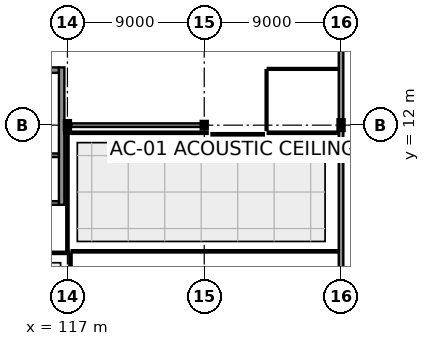
"""IFC4 building model, lengths in metres.
Left out: names, types, materials, properties, quantities, classifications, styles, units other than length and angle.
Written with IfcOpenShell. Run it as: python <this file> out.ifc"""

import sys

from ifc_helpers import new_model, si_unit, direction, frame, frame_2d, origin, origin_2d, place, context, subcontext, project, spatial, rectangle, i_section, extrude, element, fill, save


model = new_model("IFC4")
c1 = context("Model", 3, precision=1e-05, world=origin(), true_north=direction((0.0, 1.0)))
c2 = subcontext(c1, "Body", "Model", "MODEL_VIEW")
j1 = project(units=[si_unit("LENGTHUNIT", "METRE"), si_unit("PLANEANGLEUNIT", "RADIAN")], contexts=[c1])
p1 = place(None, origin())
s1 = spatial("IfcSite", under=j1, at=p1, CompositionType="ELEMENT")
p2 = place(p1, origin())
s2 = spatial("IfcBuilding", under=s1, at=p2, CompositionType="ELEMENT")
p3 = place(p2, frame((0.0, 0.0, 5.4)))
s3 = spatial("IfcBuildingStorey", under=s2, at=p3, CompositionType="ELEMENT", Elevation=5.4)
p4 = place(p3, frame((117.0, 12.0, 0.0), z_axis=(0.0, 0.0, 1.0), x_axis=(0.0, 1.0, 0.0)))
e1 = element("IfcColumn", 1, at=p4, inside=s3, PredefinedType="COLUMN", context=c2, shape_type="SweptSolid", body=[
    extrude(i_section(OverallWidth=0.3, OverallDepth=0.5, WebThickness=0.014, FlangeThickness=0.028, at=origin_2d()), origin(), (0.0, 0.0, 1.0), 4.5),
])
p5 = place(p3, frame((126.0, 12.0, 0.0), z_axis=(0.0, 0.0, 1.0), x_axis=(1.0, 0.0, 0.0)))
e2 = element("IfcColumn", 2, at=p5, inside=s3, PredefinedType="COLUMN", context=c2, shape_type="SweptSolid", body=[
    extrude(i_section(OverallWidth=0.3, OverallDepth=0.4, WebThickness=0.013, FlangeThickness=0.024, at=origin_2d()), origin(), (0.0, 0.0, 1.0), 4.5),
])
p6 = place(p3, frame((135.0, 12.0, 0.0), z_axis=(0.0, 0.0, 1.0), x_axis=(1.0, 0.0, 0.0)))
e3 = element("IfcColumn", 3, at=p6, inside=s3, PredefinedType="COLUMN", context=c2, shape_type="SweptSolid", body=[
    extrude(i_section(OverallWidth=0.305, OverallDepth=0.62, WebThickness=0.021, FlangeThickness=0.04, at=origin_2d()), origin(), (0.0, 0.0, 1.0), 4.5),
])
p7 = place(p3, frame((135.0, 0.008, 0.0), z_axis=(0.0, 0.0, 1.0), x_axis=(0.0, 1.0, 0.0)))
e4 = element("IfcWall", 4, at=p7, inside=s3, PredefinedType="SOLIDWALL", context=c2, shape_type="SweptSolid", body=[
    extrude(rectangle(XDim=11.684, YDim=0.3, at=frame_2d((5.842, 0.0))), origin(), (0.0, 0.0, 1.0), 3.575),
])
p8 = place(p7, frame((1.452, 0.0, 0.8)))
e5 = element("IfcOpeningElement", 5, at=p8, cuts=e4, PredefinedType="OPENING", context=c2, shape_type="SweptSolid", body=[
    extrude(rectangle(XDim=2.0, YDim=2.0, at=frame_2d((1.0, 1.0))), frame((0.0, 0.165, 0.0), z_axis=(0.0, -1.0, 0.0), x_axis=(1.0, 0.0, 0.0)), (0.0, 0.0, 1.0), 0.33),
])
p9 = place(p7, frame((7.412, 0.0, 0.8)))
e6 = element("IfcOpeningElement", 6, at=p9, cuts=e4, PredefinedType="OPENING", context=c2, shape_type="SweptSolid", body=[
    extrude(rectangle(XDim=2.0, YDim=2.0, at=frame_2d((1.0, 1.0))), frame((0.0, 0.165, 0.0), z_axis=(0.0, -1.0, 0.0), x_axis=(1.0, 0.0, 0.0)), (0.0, 0.0, 1.0), 0.33),
])
p10 = place(p3, frame((135.0, 12.308, 0.0), z_axis=(0.0, 0.0, 1.0), x_axis=(0.0, 1.0, 0.0)))
e7 = element("IfcWall", 7, at=p10, inside=s3, PredefinedType="SOLIDWALL", context=c2, shape_type="SweptSolid", body=[
    extrude(rectangle(XDim=11.336, YDim=0.3, at=frame_2d((5.668, 0.0))), origin(), (0.0, 0.0, 1.0), 3.575),
])
p11 = place(p10, frame((3.732, 0.0, 0.8)))
e8 = element("IfcOpeningElement", 8, at=p11, cuts=e7, PredefinedType="OPENING", context=c2, shape_type="SweptSolid", body=[
    extrude(rectangle(XDim=2.0, YDim=2.0, at=frame_2d((1.0, 1.0))), frame((0.0, 0.165, 0.0), z_axis=(0.0, -1.0, 0.0), x_axis=(1.0, 0.0, 0.0)), (0.0, 0.0, 1.0), 0.33),
])
p12 = place(p10, frame((7.162, 0.0, 0.8)))
e9 = element("IfcOpeningElement", 9, at=p12, cuts=e7, PredefinedType="OPENING", context=c2, shape_type="SweptSolid", body=[
    extrude(rectangle(XDim=2.0, YDim=2.0, at=frame_2d((1.0, 1.0))), frame((0.0, 0.165, 0.0), z_axis=(0.0, -1.0, 0.0), x_axis=(1.0, 0.0, 0.0)), (0.0, 0.0, 1.0), 0.33),
])
p13 = place(p3, frame((112.54, 15.62, 0.0), z_axis=(0.0, 0.0, 1.0), x_axis=(1.0, 0.0, 0.0)))
e10 = element("IfcWall", 10, at=p13, inside=s3, PredefinedType="SHEAR", context=c2, shape_type="SweptSolid", body=[
    extrude(rectangle(XDim=3.9, YDim=0.36, at=frame_2d((1.95, 0.0))), origin(), (0.0, 0.0, 1.0), 4.16),
])
p14 = place(p13, frame((1.15, 0.0, 0.0)))
e11 = element("IfcOpeningElement", 11, at=p14, cuts=e10, PredefinedType="OPENING", context=c2, shape_type="SweptSolid", body=[
    extrude(rectangle(XDim=1.6, YDim=2.25, at=frame_2d((0.8, 1.125))), frame((0.0, 0.195, 0.0), z_axis=(0.0, -1.0, 0.0), x_axis=(1.0, 0.0, 0.0)), (0.0, 0.0, 1.0), 0.39),
])
p15 = place(p3, frame((116.62, 6.76, 0.0), z_axis=(0.0, 0.0, 1.0), x_axis=(0.0, 1.0, 0.0)))
e12 = element("IfcWall", 12, at=p15, inside=s3, PredefinedType="SHEAR", context=c2, shape_type="SweptSolid", body=[
    extrude(rectangle(XDim=9.04, YDim=0.36, at=frame_2d((4.52, 0.0))), origin(), (0.0, 0.0, 1.0), 4.16),
])
p16 = place(p3, frame((112.54, 10.02, 0.0), z_axis=(0.0, 0.0, 1.0), x_axis=(1.0, 0.0, 0.0)))
e13 = element("IfcWall", 13, at=p16, inside=s3, PredefinedType="SHEAR", context=c2, shape_type="SweptSolid", body=[
    extrude(rectangle(XDim=3.9, YDim=0.24, at=frame_2d((1.95, 0.0))), origin(), (0.0, 0.0, 1.0), 4.31),
])
p17 = place(p16, frame((0.235, 0.0, 0.0)))
e14 = element("IfcOpeningElement", 14, at=p17, cuts=e13, PredefinedType="OPENING", context=c2, shape_type="SweptSolid", body=[
    extrude(rectangle(XDim=1.6, YDim=2.3, at=frame_2d((0.8, 1.15))), frame((0.0, 0.135, 0.0), z_axis=(0.0, -1.0, 0.0), x_axis=(1.0, 0.0, 0.0)), (0.0, 0.0, 1.0), 0.27),
])
p18 = place(p16, frame((2.185, 0.0, 0.0)))
e15 = element("IfcOpeningElement", 15, at=p18, cuts=e13, PredefinedType="OPENING", context=c2, shape_type="SweptSolid", body=[
    extrude(rectangle(XDim=1.6, YDim=2.3, at=frame_2d((0.8, 1.15))), frame((0.0, 0.135, 0.0), z_axis=(0.0, -1.0, 0.0), x_axis=(1.0, 0.0, 0.0)), (0.0, 0.0, 1.0), 0.27),
])
p19 = place(p3, frame((112.54, 6.88, 0.0), z_axis=(0.0, 0.0, 1.0), x_axis=(1.0, 0.0, 0.0)))
e16 = element("IfcWall", 16, at=p19, inside=s3, PredefinedType="SHEAR", context=c2, shape_type="SweptSolid", body=[
    extrude(rectangle(XDim=3.9, YDim=0.24, at=frame_2d((1.95, 0.0))), origin(), (0.0, 0.0, 1.0), 4.31),
])
p20 = place(p3, frame((117.248, 12.0, 0.0), z_axis=(0.0, 0.0, 1.0), x_axis=(1.0, 0.0, 0.0)))
e17 = element("IfcWall", 17, at=p20, inside=s3, PredefinedType="SHEAR", context=c2, shape_type="SweptSolid", body=[
    extrude(rectangle(XDim=8.744, YDim=0.24, at=frame_2d((4.372, 0.0))), origin(), (0.0, 0.0, 1.0), 3.585),
])
p21 = place(p3, frame((46.08, 3.6, 0.0), z_axis=(0.0, 0.0, 1.0), x_axis=(1.0, 0.0, 0.0)))
e18 = element("IfcWall", 18, at=p21, inside=s3, PredefinedType="PARTITIONING", context=c2, shape_type="SweptSolid", body=[
    extrude(rectangle(XDim=71.04, YDim=0.15, at=frame_2d((35.52, 0.0))), origin(), (0.0, 0.0, 1.0), 4.14),
])
p22 = place(p21, frame((31.995, 0.0, 0.0)))
e19 = element("IfcOpeningElement", 19, at=p22, cuts=e18, PredefinedType="OPENING", context=c2, shape_type="SweptSolid", body=[
    extrude(rectangle(XDim=1.05, YDim=2.25, at=frame_2d((0.525, 1.125))), frame((0.0, 0.09, 0.0), z_axis=(0.0, -1.0, 0.0), x_axis=(1.0, 0.0, 0.0)), (0.0, 0.0, 1.0), 0.18),
])
p23 = place(p21, frame((68.39, 0.0, 1.05)))
e20 = element("IfcOpeningElement", 20, at=p23, cuts=e18, PredefinedType="OPENING", context=c2, shape_type="SweptSolid", body=[
    extrude(rectangle(XDim=1.8, YDim=1.1, at=frame_2d((0.9, 0.55))), frame((0.0, 0.09, 0.0), z_axis=(0.0, -1.0, 0.0), x_axis=(1.0, 0.0, 0.0)), (0.0, 0.0, 1.0), 0.18),
])
p24 = place(p3, frame((117.2, 3.52, 0.0), z_axis=(0.0, 0.0, 1.0), x_axis=(0.0, -1.0, 0.0)))
e21 = element("IfcWall", 21, at=p24, inside=s3, PredefinedType="PARTITIONING", context=c2, shape_type="SweptSolid", body=[
    extrude(rectangle(XDim=3.297, YDim=0.15, at=frame_2d((1.648, 0.0))), origin(), (0.0, 0.0, 1.0), 3.685),
])
p25 = place(p3, frame((130.18, 11.5, 0.0), z_axis=(0.0, 0.0, 1.0), x_axis=(1.0, 0.0, 0.0)))
e22 = element("IfcWall", 22, at=p25, inside=s3, PredefinedType="PARTITIONING", context=c2, shape_type="SweptSolid", body=[
    extrude(rectangle(XDim=4.675, YDim=0.15, at=frame_2d((2.337, 0.0))), origin(), (0.0, 0.0, 1.0), 4.14),
])
p26 = place(p3, frame((134.855, 3.7, 0.0), z_axis=(0.0, 0.0, 1.0), x_axis=(-1.0, 0.0, 0.0)))
e23 = element("IfcWall", 23, at=p26, inside=s3, PredefinedType="PARTITIONING", context=c2, shape_type="SweptSolid", body=[
    extrude(rectangle(XDim=17.575, YDim=0.15, at=frame_2d((8.788, 0.0))), origin(), (0.0, 0.0, 1.0), 4.14),
])
p27 = place(p3, frame((117.0, 3.67, 0.0), z_axis=(0.0, 0.0, 1.0), x_axis=(0.0, 1.0, 0.0)))
e24 = element("IfcWall", 24, at=p27, inside=s3, PredefinedType="PARTITIONING", context=c2, shape_type="SweptSolid", body=[
    extrude(rectangle(XDim=7.75, YDim=0.15, at=frame_2d((3.875, 0.0))), origin(), (0.0, 0.0, 1.0), 3.685),
])
p28 = place(p3, frame((116.795, 11.5, 0.0), z_axis=(0.0, 0.0, 1.0), x_axis=(1.0, 0.0, 0.0)))
e25 = element("IfcWall", 25, at=p28, inside=s3, PredefinedType="PARTITIONING", context=c2, shape_type="SweptSolid", body=[
    extrude(rectangle(XDim=9.425, YDim=0.15, at=frame_2d((4.712, 0.0))), origin(), (0.0, 0.0, 1.0), 4.14),
])
p29 = place(p3, frame((126.48, 11.4, 0.0), z_axis=(0.0, 0.0, 1.0), x_axis=(1.0, 0.0, 0.0)))
e26 = element("IfcWall", 26, at=p29, inside=s3, PredefinedType="PARTITIONING", context=c2, shape_type="SweptSolid", body=[
    extrude(rectangle(XDim=3.44, YDim=0.15, at=frame_2d((1.72, 0.0))), origin(), (0.0, 0.0, 1.0), 4.14),
])
p30 = place(p29, frame((1.195, 0.0, 0.0)))
e27 = element("IfcOpeningElement", 27, at=p30, cuts=e26, PredefinedType="OPENING", context=c2, shape_type="SweptSolid", body=[
    extrude(rectangle(XDim=1.05, YDim=2.25, at=frame_2d((0.525, 1.125))), frame((0.0, 0.09, 0.0), z_axis=(0.0, -1.0, 0.0), x_axis=(1.0, 0.0, 0.0)), (0.0, 0.0, 1.0), 0.18),
])
p31 = place(p3, frame((130.1, 11.68, 0.0), z_axis=(0.0, 0.0, 1.0), x_axis=(0.0, 1.0, 0.0)))
e28 = element("IfcWall", 28, at=p31, inside=s3, PredefinedType="PARTITIONING", context=c2, shape_type="SweptSolid", body=[
    extrude(rectangle(XDim=3.94, YDim=0.12, at=frame_2d((1.97, 0.0))), origin(), (0.0, 0.0, 1.0), 4.14),
])
p32 = place(p3, frame((130.18, 15.7, 0.0), z_axis=(0.0, 0.0, 1.0), x_axis=(1.0, 0.0, 0.0)))
e29 = element("IfcWall", 29, at=p32, inside=s3, PredefinedType="PARTITIONING", context=c2, shape_type="SweptSolid", body=[
    extrude(rectangle(XDim=4.675, YDim=0.12, at=frame_2d((2.337, 0.0))), origin(), (0.0, 0.0, 1.0), 4.14),
])
p33 = place(p32, frame((1.862, 0.0, 0.0)))
e30 = element("IfcOpeningElement", 30, at=p33, cuts=e29, PredefinedType="OPENING", context=c2, shape_type="SweptSolid", body=[
    extrude(rectangle(XDim=0.95, YDim=2.15, at=frame_2d((0.475, 1.075))), frame((0.0, 0.075, 0.0), z_axis=(0.0, -1.0, 0.0), x_axis=(1.0, 0.0, 0.0)), (0.0, 0.0, 1.0), 0.15),
])
p34 = place(p8, origin())
e31 = element("IfcWindow", 31, at=p34, inside=s3, PartitioningType="SINGLE_PANEL", PredefinedType="WINDOW", context=c2, shape_type="SweptSolid", body=[
    extrude(rectangle(XDim=2.0, YDim=2.0, at=frame_2d((1.0, 1.0))), frame((0.0, 0.03, 0.0), z_axis=(0.0, -1.0, 0.0), x_axis=(1.0, 0.0, 0.0)), (0.0, 0.0, 1.0), 0.06),
])
fill(e5, e31)
p35 = place(p9, origin())
e32 = element("IfcWindow", 32, at=p35, inside=s3, PartitioningType="SINGLE_PANEL", PredefinedType="WINDOW", context=c2, shape_type="SweptSolid", body=[
    extrude(rectangle(XDim=2.0, YDim=2.0, at=frame_2d((1.0, 1.0))), frame((0.0, 0.03, 0.0), z_axis=(0.0, -1.0, 0.0), x_axis=(1.0, 0.0, 0.0)), (0.0, 0.0, 1.0), 0.06),
])
fill(e6, e32)
p36 = place(p11, origin())
e33 = element("IfcWindow", 33, at=p36, inside=s3, PartitioningType="SINGLE_PANEL", PredefinedType="WINDOW", context=c2, shape_type="SweptSolid", body=[
    extrude(rectangle(XDim=2.0, YDim=2.0, at=frame_2d((1.0, 1.0))), frame((0.0, 0.03, 0.0), z_axis=(0.0, -1.0, 0.0), x_axis=(1.0, 0.0, 0.0)), (0.0, 0.0, 1.0), 0.06),
])
fill(e8, e33)
p37 = place(p18, origin())
e34 = element("IfcDoor", 34, at=p37, inside=s3, OperationType="DOUBLE_DOOR_SLIDING", PredefinedType="DOOR", context=c2, shape_type="SweptSolid", body=[
    extrude(rectangle(XDim=1.6, YDim=2.3, at=frame_2d((0.8, 1.15))), frame((0.0, 0.025, 0.0), z_axis=(0.0, -1.0, 0.0), x_axis=(1.0, 0.0, 0.0)), (0.0, 0.0, 1.0), 0.05),
])
fill(e15, e34)
p38 = place(p23, origin())
e35 = element("IfcWindow", 35, at=p38, inside=s3, PartitioningType="SINGLE_PANEL", PredefinedType="WINDOW", context=c2, shape_type="SweptSolid", body=[
    extrude(rectangle(XDim=1.8, YDim=1.1, at=frame_2d((0.9, 0.55))), frame((0.0, 0.03, 0.0), z_axis=(0.0, -1.0, 0.0), x_axis=(1.0, 0.0, 0.0)), (0.0, 0.0, 1.0), 0.06),
])
fill(e20, e35)
p39 = place(p30, frame((1.05, 0.0, 0.0), z_axis=(0.0, 0.0, 1.0), x_axis=(-1.0, 0.0, 0.0)))
e36 = element("IfcDoor", 36, at=p39, inside=s3, OperationType="SINGLE_SWING_RIGHT", PredefinedType="DOOR", context=c2, shape_type="SweptSolid", body=[
    extrude(rectangle(XDim=1.05, YDim=2.25, at=frame_2d((0.525, 1.125))), frame((0.0, 0.025, 0.0), z_axis=(0.0, -1.0, 0.0), x_axis=(1.0, 0.0, 0.0)), (0.0, 0.0, 1.0), 0.05),
])
fill(e27, e36)
p40 = place(p33, origin())
e37 = element("IfcDoor", 37, at=p40, inside=s3, OperationType="SINGLE_SWING_LEFT", PredefinedType="DOOR", context=c2, shape_type="SweptSolid", body=[
    extrude(rectangle(XDim=0.95, YDim=2.15, at=frame_2d((0.475, 1.075))), frame((0.0, 0.025, 0.0), z_axis=(0.0, -1.0, 0.0), x_axis=(1.0, 0.0, 0.0)), (0.0, 0.0, 1.0), 0.05),
])
fill(e30, e37)
save(model, sys.argv[1])
